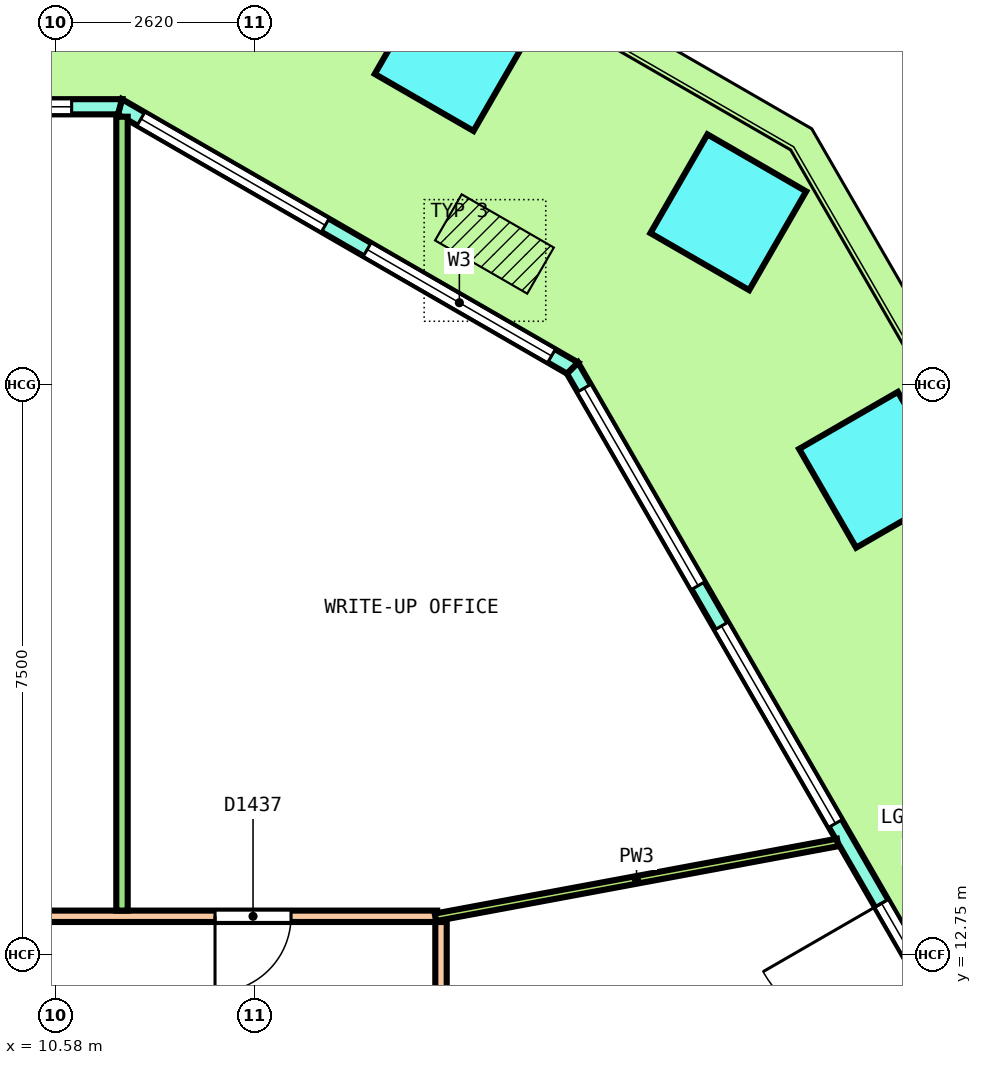
"""IFC4 building model, lengths in metres.
Left out: names, types, materials, properties, quantities, classifications, styles, units other than length and angle.
Written with IfcOpenShell. Run it as: python <this file> out.ifc"""

import sys

from ifc_helpers import new_model, si_unit, direction, frame, frame_2d, origin, origin_2d, place, context, subcontext, project, spatial, polyline, rectangle, outline, extrude, element, fill, save


model = new_model("IFC4")
c1 = context("Model", 3, precision=1e-05, world=origin(), true_north=direction((0.0, 1.0)))
c2 = subcontext(c1, "Body", "Model", "MODEL_VIEW")
j1 = project(units=[si_unit("LENGTHUNIT", "METRE"), si_unit("PLANEANGLEUNIT", "RADIAN")], contexts=[c1])
p1 = place(None, origin())
s1 = spatial("IfcSite", under=j1, at=p1, CompositionType="ELEMENT")
p2 = place(p1, origin())
s2 = spatial("IfcBuilding", under=s1, at=p2, CompositionType="ELEMENT")
p3 = place(p2, frame((0.0, 0.0, 58.6)))
s3 = spatial("IfcBuildingStorey", under=s2, at=p3, CompositionType="ELEMENT", Elevation=58.6)
for number, where, z_axis, x_axis in (
    (1, (21.386, 19.124, 0.0), (0.0, 0.0, 1.0), (-0.5, 0.866, 0.0)),
    (2, (19.43, 22.512, 0.0), (0.0, 0.0, 1.0), (-0.866, 0.5, 0.0)),
    (3, (15.803, 24.606, 0.0), (0.0, 0.0, 1.0), (-0.866, 0.5, 0.0)),
):
    element("IfcColumn", number, at=place(p3, frame(where, z_axis=z_axis, x_axis=x_axis)), inside=s3, PredefinedType="COLUMN", context=c2, shape_type="SweptSolid", body=[
        extrude(rectangle(XDim=1.5, YDim=1.5, at=origin_2d()), origin(), (0.0, 0.0, 1.0), 4.05),
    ])
p4 = place(p3, frame((26.411, 4.82, 0.0), z_axis=(0.0, 0.0, 1.0), x_axis=(-0.500000137386, 0.866025324465, 0.0)))
e4 = element("IfcWall", 4, at=p4, inside=s3, PredefinedType="SOLIDWALL", context=c2, shape_type="SweptSolid", body=[
    extrude(outline(polyline([(-0.027, -0.1), (0.979, -0.1), (1.986, -0.1), (2.992, -0.1), (3.999, -0.1), (5.005, -0.1), (6.012, -0.1), (7.018, -0.1), (8.025, -0.1), (9.031, -0.1), (10.038, -0.1), (11.044, -0.1), (12.051, -0.1), (13.057, -0.1), (14.063, -0.1), (15.07, -0.1), (16.076, -0.1), (17.083, -0.1), (18.089, -0.1), (18.036, 0.1), (17.035, 0.1), (16.035, 0.1), (15.034, 0.1), (14.034, 0.1), (13.033, 0.1), (12.033, 0.1), (11.032, 0.1), (10.032, 0.1), (9.031, 0.1), (8.031, 0.1), (7.03, 0.1), (6.03, 0.1), (5.029, 0.1), (4.029, 0.1), (3.028, 0.1), (2.028, 0.1), (1.027, 0.1), (0.027, 0.1), (-0.027, -0.1)])), origin(), (0.0, 0.0, 1.0), 4.1),
])
p5 = place(p4, frame((0.306, 0.0, 0.1)))
e5 = element("IfcOpeningElement", 5, at=p5, cuts=e4, PredefinedType="OPENING", context=c2, shape_type="SweptSolid", body=[
    extrude(rectangle(XDim=3.0, YDim=2.9, at=frame_2d((1.5, 1.45))), frame((0.0, 0.11, 0.0), z_axis=(0.0, -1.0, 0.0), x_axis=(1.0, 0.0, 0.0)), (0.0, 0.0, 1.0), 0.22),
])
p6 = place(p4, frame((3.919, 0.0, 0.1)))
e6 = element("IfcOpeningElement", 6, at=p6, cuts=e4, PredefinedType="OPENING", context=c2, shape_type="SweptSolid", body=[
    extrude(rectangle(XDim=3.0, YDim=2.9, at=frame_2d((1.5, 1.45))), frame((0.0, 0.11, 0.0), z_axis=(0.0, -1.0, 0.0), x_axis=(1.0, 0.0, 0.0)), (0.0, 0.0, 1.0), 0.22),
])
p7 = place(p4, frame((8.131, 0.0, 0.0)))
e7 = element("IfcOpeningElement", 7, at=p7, cuts=e4, PredefinedType="OPENING", context=c2, shape_type="SweptSolid", body=[
    extrude(rectangle(XDim=1.8, YDim=2.4, at=frame_2d((0.9, 1.2))), frame((0.0, 0.11, 0.0), z_axis=(0.0, -1.0, 0.0), x_axis=(1.0, 0.0, 0.0)), (0.0, 0.0, 1.0), 0.22),
])
p8 = place(p4, frame((8.131, 0.0, 2.55)))
e8 = element("IfcOpeningElement", 8, at=p8, cuts=e4, PredefinedType="OPENING", context=c2, shape_type="SweptSolid", body=[
    extrude(rectangle(XDim=1.8, YDim=0.45, at=frame_2d((0.9, 0.225))), frame((0.0, 0.11, 0.0), z_axis=(0.0, -1.0, 0.0), x_axis=(1.0, 0.0, 0.0)), (0.0, 0.0, 1.0), 0.22),
])
p9 = place(p4, frame((11.144, 0.0, 0.1)))
e9 = element("IfcOpeningElement", 9, at=p9, cuts=e4, PredefinedType="OPENING", context=c2, shape_type="SweptSolid", body=[
    extrude(rectangle(XDim=3.0, YDim=2.9, at=frame_2d((1.5, 1.45))), frame((0.0, 0.11, 0.0), z_axis=(0.0, -1.0, 0.0), x_axis=(1.0, 0.0, 0.0)), (0.0, 0.0, 1.0), 0.22),
])
p10 = place(p4, frame((14.756, 0.0, 0.1)))
e10 = element("IfcOpeningElement", 10, at=p10, cuts=e4, PredefinedType="OPENING", context=c2, shape_type="SweptSolid", body=[
    extrude(rectangle(XDim=3.0, YDim=2.9, at=frame_2d((1.5, 1.45))), frame((0.0, 0.11, 0.0), z_axis=(0.0, -1.0, 0.0), x_axis=(1.0, 0.0, 0.0)), (0.0, 0.0, 1.0), 0.22),
])
p11 = place(p3, frame((17.38, 20.463, 0.0), z_axis=(0.0, 0.0, 1.0), x_axis=(-0.866029458321, 0.49999297727, 0.0)))
e11 = element("IfcWall", 11, at=p11, inside=s3, PredefinedType="SOLIDWALL", context=c2, shape_type="SweptSolid", body=[
    extrude(outline(polyline([(-0.027, -0.1), (1.128, -0.1), (2.282, -0.1), (3.437, -0.1), (4.592, -0.1), (5.747, -0.1), (6.901, -0.1), (6.848, 0.1), (5.711, 0.1), (4.574, 0.1), (3.437, 0.1), (2.301, 0.1), (1.164, 0.1), (0.027, 0.1), (-0.027, -0.1)])), origin(), (0.0, 0.0, 1.0), 4.1),
])
p12 = place(p11, frame((0.319, 0.0, 0.1)))
e12 = element("IfcOpeningElement", 12, at=p12, cuts=e11, PredefinedType="OPENING", context=c2, shape_type="SweptSolid", body=[
    extrude(rectangle(XDim=2.8, YDim=2.9, at=frame_2d((1.4, 1.45))), frame((0.0, 0.11, 0.0), z_axis=(0.0, -1.0, 0.0), x_axis=(1.0, 0.0, 0.0)), (0.0, 0.0, 1.0), 0.22),
])
p13 = place(p11, frame((3.756, 0.0, 0.1)))
e13 = element("IfcOpeningElement", 13, at=p13, cuts=e11, PredefinedType="OPENING", context=c2, shape_type="SweptSolid", body=[
    extrude(rectangle(XDim=2.8, YDim=2.9, at=frame_2d((1.4, 1.45))), frame((0.0, 0.11, 0.0), z_axis=(0.0, -1.0, 0.0), x_axis=(1.0, 0.0, 0.0)), (0.0, 0.0, 1.0), 0.22),
])
p14 = place(p3, frame((11.426, 23.9, 0.0), z_axis=(0.0, 0.0, 1.0), x_axis=(-1.0, 0.0, 0.0)))
e14 = element("IfcWall", 14, at=p14, inside=s3, PredefinedType="SOLIDWALL", context=c2, shape_type="SweptSolid", body=[
    extrude(outline(polyline([(-0.027, -0.1), (1.014, -0.1), (2.055, -0.1), (3.097, -0.1), (4.138, -0.1), (5.179, -0.1), (6.22, -0.1), (7.261, -0.1), (8.303, -0.1), (9.344, -0.1), (10.385, -0.1), (11.426, -0.1), (12.468, -0.1), (13.509, -0.1), (14.55, -0.1), (15.591, -0.1), (16.632, -0.1), (17.673, -0.1), (18.715, -0.1), (19.756, -0.1), (20.797, -0.1), (21.838, -0.1), (22.879, -0.1), (22.826, 0.1), (21.789, 0.1), (20.753, 0.1), (19.717, 0.1), (18.68, 0.1), (17.644, 0.1), (16.608, 0.1), (15.572, 0.1), (14.535, 0.1), (13.499, 0.1), (12.463, 0.1), (11.426, 0.1), (10.39, 0.1), (9.354, 0.1), (8.317, 0.1), (7.281, 0.1), (6.245, 0.1), (5.208, 0.1), (4.172, 0.1), (3.136, 0.1), (2.099, 0.1), (1.063, 0.1), (0.027, 0.1), (-0.027, -0.1)])), origin(), (0.0, 0.0, 1.0), 4.1),
])
p15 = place(p14, frame((0.635, 0.0, 0.1)))
e15 = element("IfcOpeningElement", 15, at=p15, cuts=e14, PredefinedType="OPENING", context=c2, shape_type="SweptSolid", body=[
    extrude(rectangle(XDim=3.3, YDim=2.9, at=frame_2d((1.65, 1.45))), frame((0.0, 0.11, 0.0), z_axis=(0.0, -1.0, 0.0), x_axis=(1.0, 0.0, 0.0)), (0.0, 0.0, 1.0), 0.22),
])
p16 = place(p14, frame((5.206, 0.0, 0.1)))
e16 = element("IfcOpeningElement", 16, at=p16, cuts=e14, PredefinedType="OPENING", context=c2, shape_type="SweptSolid", body=[
    extrude(rectangle(XDim=3.3, YDim=2.9, at=frame_2d((1.65, 1.45))), frame((0.0, 0.11, 0.0), z_axis=(0.0, -1.0, 0.0), x_axis=(1.0, 0.0, 0.0)), (0.0, 0.0, 1.0), 0.22),
])
p17 = place(p14, frame((10.526, 0.0, 0.0)))
e17 = element("IfcOpeningElement", 17, at=p17, cuts=e14, PredefinedType="OPENING", context=c2, shape_type="SweptSolid", body=[
    extrude(rectangle(XDim=1.8, YDim=2.4, at=frame_2d((0.9, 1.2))), frame((0.0, 0.11, 0.0), z_axis=(0.0, -1.0, 0.0), x_axis=(1.0, 0.0, 0.0)), (0.0, 0.0, 1.0), 0.22),
])
p18 = place(p14, frame((10.526, 0.0, 2.55)))
e18 = element("IfcOpeningElement", 18, at=p18, cuts=e14, PredefinedType="OPENING", context=c2, shape_type="SweptSolid", body=[
    extrude(rectangle(XDim=1.8, YDim=0.45, at=frame_2d((0.9, 0.225))), frame((0.0, 0.11, 0.0), z_axis=(0.0, -1.0, 0.0), x_axis=(1.0, 0.0, 0.0)), (0.0, 0.0, 1.0), 0.22),
])
p19 = place(p14, frame((14.347, 0.0, 0.1)))
e19 = element("IfcOpeningElement", 19, at=p19, cuts=e14, PredefinedType="OPENING", context=c2, shape_type="SweptSolid", body=[
    extrude(rectangle(XDim=3.3, YDim=2.9, at=frame_2d((1.65, 1.45))), frame((0.0, 0.11, 0.0), z_axis=(0.0, -1.0, 0.0), x_axis=(1.0, 0.0, 0.0)), (0.0, 0.0, 1.0), 0.22),
])
p20 = place(p14, frame((18.917, 0.0, 0.1)))
e20 = element("IfcOpeningElement", 20, at=p20, cuts=e14, PredefinedType="OPENING", context=c2, shape_type="SweptSolid", body=[
    extrude(rectangle(XDim=3.3, YDim=2.9, at=frame_2d((1.65, 1.45))), frame((0.0, 0.11, 0.0), z_axis=(0.0, -1.0, 0.0), x_axis=(1.0, 0.0, 0.0)), (0.0, 0.0, 1.0), 0.22),
])
p21 = place(p3, frame((15.65, -13.175, 0.0), z_axis=(0.0, 0.0, 1.0), x_axis=(0.0, 1.0, 0.0)))
e21 = element("IfcWall", 21, at=p21, inside=s3, PredefinedType="PARTITIONING", context=c2, shape_type="SweptSolid", body=[
    extrude(rectangle(XDim=26.35, YDim=0.15, at=frame_2d((13.175, 0.0))), origin(), (0.0, 0.0, 1.0), 3.05),
])
p22 = place(p21, frame((16.576, 0.0, 0.0)))
e22 = element("IfcOpeningElement", 22, at=p22, cuts=e21, PredefinedType="OPENING", context=c2, shape_type="SweptSolid", body=[
    extrude(rectangle(XDim=1.2, YDim=2.1, at=frame_2d((0.6, 1.05))), frame((0.0, 0.085, 0.0), z_axis=(0.0, -1.0, 0.0), x_axis=(1.0, 0.0, 0.0)), (0.0, 0.0, 1.0), 0.17),
])
p23 = place(p21, frame((22.401, 0.0, 0.0)))
e23 = element("IfcOpeningElement", 23, at=p23, cuts=e21, PredefinedType="OPENING", context=c2, shape_type="SweptSolid", body=[
    extrude(rectangle(XDim=1.0, YDim=2.1, at=frame_2d((0.5, 1.05))), frame((0.0, 0.085, 0.0), z_axis=(0.0, -1.0, 0.0), x_axis=(1.0, 0.0, 0.0)), (0.0, 0.0, 1.0), 0.17),
])
p24 = place(p21, frame((1.65, 0.0, 0.0)))
e24 = element("IfcOpeningElement", 24, at=p24, cuts=e21, PredefinedType="OPENING", context=c2, shape_type="SweptSolid", body=[
    extrude(rectangle(XDim=1.0, YDim=2.1, at=frame_2d((0.5, 1.05))), frame((0.0, 0.085, 0.0), z_axis=(0.0, -1.0, 0.0), x_axis=(1.0, 0.0, 0.0)), (0.0, 0.0, 1.0), 0.17),
])
p25 = place(p3, frame((-15.575, 13.25, 0.0), z_axis=(0.0, 0.0, 1.0), x_axis=(1.0, 0.0, 0.0)))
e25 = element("IfcWall", 25, at=p25, inside=s3, PredefinedType="PARTITIONING", context=c2, shape_type="SweptSolid", body=[
    extrude(rectangle(XDim=31.175, YDim=0.15, at=frame_2d((15.587, 0.0))), origin(), (0.0, 0.0, 1.0), 3.05),
])
p26 = place(p25, frame((28.252, 0.0, 0.0)))
e26 = element("IfcOpeningElement", 26, at=p26, cuts=e25, PredefinedType="OPENING", context=c2, shape_type="SweptSolid", body=[
    extrude(rectangle(XDim=1.0, YDim=2.1, at=frame_2d((0.5, 1.05))), frame((0.0, 0.085, 0.0), z_axis=(0.0, -1.0, 0.0), x_axis=(1.0, 0.0, 0.0)), (0.0, 0.0, 1.0), 0.17),
])
p27 = place(p25, frame((14.802, 0.0, 0.0)))
e27 = element("IfcOpeningElement", 27, at=p27, cuts=e25, PredefinedType="OPENING", context=c2, shape_type="SweptSolid", body=[
    extrude(rectangle(XDim=1.2, YDim=2.1, at=frame_2d((0.6, 1.05))), frame((0.0, 0.085, 0.0), z_axis=(0.0, -1.0, 0.0), x_axis=(1.0, 0.0, 0.0)), (0.0, 0.0, 1.0), 0.17),
])
p28 = place(p25, frame((5.812, 0.0, 0.0)))
e28 = element("IfcOpeningElement", 28, at=p28, cuts=e25, PredefinedType="OPENING", context=c2, shape_type="SweptSolid", body=[
    extrude(rectangle(XDim=1.2, YDim=2.1, at=frame_2d((0.6, 1.05))), frame((0.0, 0.085, 0.0), z_axis=(0.0, -1.0, 0.0), x_axis=(1.0, 0.0, 0.0)), (0.0, 0.0, 1.0), 0.17),
])
p29 = place(p25, frame((0.849, 0.0, 0.0)))
e29 = element("IfcOpeningElement", 29, at=p29, cuts=e25, PredefinedType="OPENING", context=c2, shape_type="SweptSolid", body=[
    extrude(rectangle(XDim=1.2, YDim=2.1, at=frame_2d((0.6, 1.05))), frame((0.0, 0.085, 0.0), z_axis=(0.0, -1.0, 0.0), x_axis=(1.0, 0.0, 0.0)), (0.0, 0.0, 1.0), 0.17),
])
p30 = place(p3, frame((11.453, 13.325, 0.0), z_axis=(0.0, 0.0, 1.0), x_axis=(0.0, 1.0, 0.0)))
e30 = element("IfcWall", 30, at=p30, inside=s3, PredefinedType="PARTITIONING", context=c2, shape_type="SweptSolid", body=[
    extrude(rectangle(XDim=10.444, YDim=0.15, at=frame_2d((5.222, 0.0))), origin(), (0.0, 0.0, 1.0), 3.05),
])
p31 = place(p3, frame((15.576, 13.236, 0.0), z_axis=(0.0, 0.0, 1.0), x_axis=(0.983108608108, 0.183023126037, 0.0)))
e31 = element("IfcWall", 31, at=p31, inside=s3, PredefinedType="PARTITIONING", context=c2, shape_type="SweptSolid", body=[
    extrude(rectangle(XDim=5.382, YDim=0.1, at=frame_2d((2.691, 0.0))), origin(), (0.0, 0.0, 1.0), 3.05),
])
p32 = place(p7, origin())
e32 = element("IfcDoor", 32, at=p32, inside=s3, OperationType="DOUBLE_DOOR_SINGLE_SWING", PredefinedType="DOOR", context=c2, shape_type="SweptSolid", body=[
    extrude(rectangle(XDim=1.8, YDim=2.4, at=frame_2d((0.9, 1.2))), frame((0.0, 0.025, 0.0), z_axis=(0.0, -1.0, 0.0), x_axis=(1.0, 0.0, 0.0)), (0.0, 0.0, 1.0), 0.05),
])
fill(e7, e32)
p33 = place(p8, origin())
e33 = element("IfcWindow", 33, at=p33, inside=s3, PartitioningType="SINGLE_PANEL", PredefinedType="WINDOW", context=c2, shape_type="SweptSolid", body=[
    extrude(rectangle(XDim=1.8, YDim=0.45, at=frame_2d((0.9, 0.225))), frame((0.0, 0.03, 0.0), z_axis=(0.0, -1.0, 0.0), x_axis=(1.0, 0.0, 0.0)), (0.0, 0.0, 1.0), 0.06),
])
fill(e8, e33)
p34 = place(p9, origin())
e34 = element("IfcWindow", 34, at=p34, inside=s3, PartitioningType="SINGLE_PANEL", PredefinedType="WINDOW", context=c2, shape_type="SweptSolid", body=[
    extrude(rectangle(XDim=3.0, YDim=2.9, at=frame_2d((1.5, 1.45))), frame((0.0, 0.03, 0.0), z_axis=(0.0, -1.0, 0.0), x_axis=(1.0, 0.0, 0.0)), (0.0, 0.0, 1.0), 0.06),
])
fill(e9, e34)
p35 = place(p10, origin())
e35 = element("IfcWindow", 35, at=p35, inside=s3, PartitioningType="SINGLE_PANEL", PredefinedType="WINDOW", context=c2, shape_type="SweptSolid", body=[
    extrude(rectangle(XDim=3.0, YDim=2.9, at=frame_2d((1.5, 1.45))), frame((0.0, 0.03, 0.0), z_axis=(0.0, -1.0, 0.0), x_axis=(1.0, 0.0, 0.0)), (0.0, 0.0, 1.0), 0.06),
])
fill(e10, e35)
p36 = place(p12, origin())
e36 = element("IfcWindow", 36, at=p36, inside=s3, PartitioningType="SINGLE_PANEL", PredefinedType="WINDOW", context=c2, shape_type="SweptSolid", body=[
    extrude(rectangle(XDim=2.8, YDim=2.9, at=frame_2d((1.4, 1.45))), frame((0.0, 0.03, 0.0), z_axis=(0.0, -1.0, 0.0), x_axis=(1.0, 0.0, 0.0)), (0.0, 0.0, 1.0), 0.06),
])
fill(e12, e36)
p37 = place(p13, origin())
e37 = element("IfcWindow", 37, at=p37, inside=s3, PartitioningType="SINGLE_PANEL", PredefinedType="WINDOW", context=c2, shape_type="SweptSolid", body=[
    extrude(rectangle(XDim=2.8, YDim=2.9, at=frame_2d((1.4, 1.45))), frame((0.0, 0.03, 0.0), z_axis=(0.0, -1.0, 0.0), x_axis=(1.0, 0.0, 0.0)), (0.0, 0.0, 1.0), 0.06),
])
fill(e13, e37)
p38 = place(p15, origin())
e38 = element("IfcWindow", 38, at=p38, inside=s3, PartitioningType="SINGLE_PANEL", PredefinedType="WINDOW", context=c2, shape_type="SweptSolid", body=[
    extrude(rectangle(XDim=3.3, YDim=2.9, at=frame_2d((1.65, 1.45))), frame((0.0, 0.03, 0.0), z_axis=(0.0, -1.0, 0.0), x_axis=(1.0, 0.0, 0.0)), (0.0, 0.0, 1.0), 0.06),
])
fill(e15, e38)
p39 = place(p26, origin())
e39 = element("IfcDoor", 39, at=p39, inside=s3, OperationType="SINGLE_SWING_LEFT", PredefinedType="DOOR", context=c2, shape_type="SweptSolid", body=[
    extrude(rectangle(XDim=1.0, YDim=2.1, at=frame_2d((0.5, 1.05))), frame((0.0, 0.025, 0.0), z_axis=(0.0, -1.0, 0.0), x_axis=(1.0, 0.0, 0.0)), (0.0, 0.0, 1.0), 0.05),
])
fill(e26, e39)
save(model, sys.argv[1])
